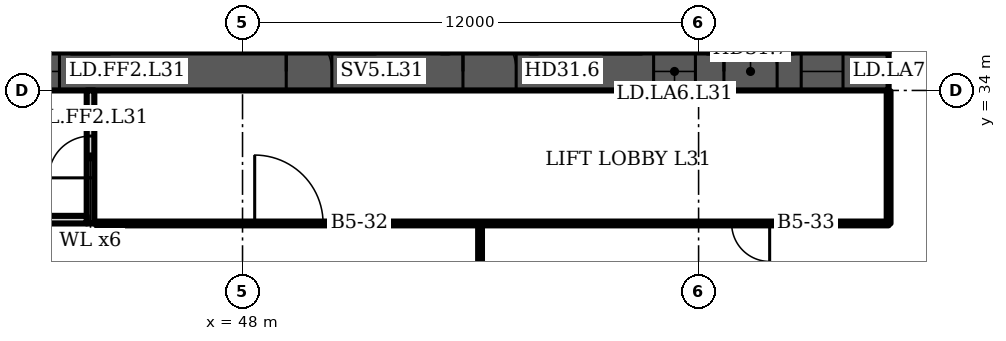
"""IFC4 building model, lengths in metres.
Left out: names, types, materials, properties, quantities, classifications, styles, units other than length and angle.
Written with IfcOpenShell. Run it as: python <this file> out.ifc"""

import sys

from ifc_helpers import new_model, si_unit, direction, frame, frame_2d, origin, place, context, subcontext, project, spatial, rectangle, extrude, element, fill, save


model = new_model("IFC4")
c1 = context("Model", 3, precision=1e-05, world=origin(), true_north=direction((0.0, 1.0)))
c2 = subcontext(c1, "Body", "Model", "MODEL_VIEW")
j1 = project(units=[si_unit("LENGTHUNIT", "METRE"), si_unit("PLANEANGLEUNIT", "RADIAN")], contexts=[c1])
p1 = place(None, origin())
s1 = spatial("IfcSite", under=j1, at=p1, CompositionType="ELEMENT")
p2 = place(p1, origin())
s2 = spatial("IfcBuilding", under=s1, at=p2, CompositionType="ELEMENT")
p3 = place(p2, frame((0.0, 0.0, 132.7)))
s3 = spatial("IfcBuildingStorey", under=s2, at=p3, CompositionType="ELEMENT", Elevation=132.7)
p4 = place(p3, frame((16.0, 34.5, 0.0), z_axis=(0.0, 0.0, 1.0), x_axis=(1.0, 0.0, 0.0)))
e1 = element("IfcWall", 1, at=p4, inside=s3, PredefinedType="SHEAR", context=c2, shape_type="SweptSolid", body=[
    extrude(rectangle(XDim=49.0, YDim=1.0, at=frame_2d((24.5, 0.0))), origin(), (0.0, 0.0, 1.0), 3.6),
])
p5 = place(p4, frame((1.2, 0.0, 0.0)))
e2 = element("IfcOpeningElement", 2, at=p5, cuts=e1, PredefinedType="OPENING", context=c2, shape_type="SweptSolid", body=[
    extrude(rectangle(XDim=1.1, YDim=2.1, at=frame_2d((0.55, 1.05))), frame((0.0, 0.51, 0.0), z_axis=(0.0, -1.0, 0.0), x_axis=(1.0, 0.0, 0.0)), (0.0, 0.0, 1.0), 1.02),
])
p6 = place(p4, frame((5.083, 0.0, 0.0)))
e3 = element("IfcOpeningElement", 3, at=p6, cuts=e1, PredefinedType="OPENING", context=c2, shape_type="SweptSolid", body=[
    extrude(rectangle(XDim=1.1, YDim=2.1, at=frame_2d((0.55, 1.05))), frame((0.0, 0.51, 0.0), z_axis=(0.0, -1.0, 0.0), x_axis=(1.0, 0.0, 0.0)), (0.0, 0.0, 1.0), 1.02),
])
p7 = place(p4, frame((2.933, 0.0, 0.0)))
e4 = element("IfcOpeningElement", 4, at=p7, cuts=e1, PredefinedType="OPENING", context=c2, shape_type="SweptSolid", body=[
    extrude(rectangle(XDim=1.4, YDim=2.1, at=frame_2d((0.7, 1.05))), frame((0.0, 0.51, 0.0), z_axis=(0.0, -1.0, 0.0), x_axis=(1.0, 0.0, 0.0)), (0.0, 0.0, 1.0), 1.02),
])
p8 = place(p4, frame((7.65, 0.0, 0.0)))
e5 = element("IfcOpeningElement", 5, at=p8, cuts=e1, PredefinedType="OPENING", context=c2, shape_type="SweptSolid", body=[
    extrude(rectangle(XDim=1.2, YDim=2.1, at=frame_2d((0.6, 1.05))), frame((0.0, 0.51, 0.0), z_axis=(0.0, -1.0, 0.0), x_axis=(1.0, 0.0, 0.0)), (0.0, 0.0, 1.0), 1.02),
])
p9 = place(p4, frame((14.817, 0.0, 0.0)))
e6 = element("IfcOpeningElement", 6, at=p9, cuts=e1, PredefinedType="OPENING", context=c2, shape_type="SweptSolid", body=[
    extrude(rectangle(XDim=1.1, YDim=2.1, at=frame_2d((0.55, 1.05))), frame((0.0, 0.51, 0.0), z_axis=(0.0, -1.0, 0.0), x_axis=(1.0, 0.0, 0.0)), (0.0, 0.0, 1.0), 1.02),
])
p10 = place(p4, frame((19.083, 0.0, 0.0)))
e7 = element("IfcOpeningElement", 7, at=p10, cuts=e1, PredefinedType="OPENING", context=c2, shape_type="SweptSolid", body=[
    extrude(rectangle(XDim=1.1, YDim=2.1, at=frame_2d((0.55, 1.05))), frame((0.0, 0.51, 0.0), z_axis=(0.0, -1.0, 0.0), x_axis=(1.0, 0.0, 0.0)), (0.0, 0.0, 1.0), 1.02),
])
p11 = place(p4, frame((16.8, 0.0, 0.0)))
e8 = element("IfcOpeningElement", 8, at=p11, cuts=e1, PredefinedType="OPENING", context=c2, shape_type="SweptSolid", body=[
    extrude(rectangle(XDim=1.4, YDim=2.1, at=frame_2d((0.7, 1.05))), frame((0.0, 0.51, 0.0), z_axis=(0.0, -1.0, 0.0), x_axis=(1.0, 0.0, 0.0)), (0.0, 0.0, 1.0), 1.02),
])
p12 = place(p4, frame((21.817, 0.0, 0.0)))
e9 = element("IfcOpeningElement", 9, at=p12, cuts=e1, PredefinedType="OPENING", context=c2, shape_type="SweptSolid", body=[
    extrude(rectangle(XDim=1.1, YDim=2.1, at=frame_2d((0.55, 1.05))), frame((0.0, 0.51, 0.0), z_axis=(0.0, -1.0, 0.0), x_axis=(1.0, 0.0, 0.0)), (0.0, 0.0, 1.0), 1.02),
])
p13 = place(p4, frame((26.083, 0.0, 0.0)))
e10 = element("IfcOpeningElement", 10, at=p13, cuts=e1, PredefinedType="OPENING", context=c2, shape_type="SweptSolid", body=[
    extrude(rectangle(XDim=1.1, YDim=2.1, at=frame_2d((0.55, 1.05))), frame((0.0, 0.51, 0.0), z_axis=(0.0, -1.0, 0.0), x_axis=(1.0, 0.0, 0.0)), (0.0, 0.0, 1.0), 1.02),
])
p14 = place(p4, frame((33.15, 0.0, 0.0)))
e11 = element("IfcOpeningElement", 11, at=p14, cuts=e1, PredefinedType="OPENING", context=c2, shape_type="SweptSolid", body=[
    extrude(rectangle(XDim=1.2, YDim=2.1, at=frame_2d((0.6, 1.05))), frame((0.0, 0.51, 0.0), z_axis=(0.0, -1.0, 0.0), x_axis=(1.0, 0.0, 0.0)), (0.0, 0.0, 1.0), 1.02),
])
p15 = place(p4, frame((37.8, 0.0, 0.0)))
e12 = element("IfcOpeningElement", 12, at=p15, cuts=e1, PredefinedType="OPENING", context=c2, shape_type="SweptSolid", body=[
    extrude(rectangle(XDim=1.4, YDim=2.1, at=frame_2d((0.7, 1.05))), frame((0.0, 0.51, 0.0), z_axis=(0.0, -1.0, 0.0), x_axis=(1.0, 0.0, 0.0)), (0.0, 0.0, 1.0), 1.02),
])
p16 = place(p4, frame((42.817, 0.0, 0.0)))
e13 = element("IfcOpeningElement", 13, at=p16, cuts=e1, PredefinedType="OPENING", context=c2, shape_type="SweptSolid", body=[
    extrude(rectangle(XDim=1.1, YDim=2.1, at=frame_2d((0.55, 1.05))), frame((0.0, 0.51, 0.0), z_axis=(0.0, -1.0, 0.0), x_axis=(1.0, 0.0, 0.0)), (0.0, 0.0, 1.0), 1.02),
])
p17 = place(p4, frame((46.7, 0.0, 0.0)))
e14 = element("IfcOpeningElement", 14, at=p17, cuts=e1, PredefinedType="OPENING", context=c2, shape_type="SweptSolid", body=[
    extrude(rectangle(XDim=1.1, YDim=2.1, at=frame_2d((0.55, 1.05))), frame((0.0, 0.51, 0.0), z_axis=(0.0, -1.0, 0.0), x_axis=(1.0, 0.0, 0.0)), (0.0, 0.0, 1.0), 1.02),
])
p18 = place(p4, frame((44.667, 0.0, 0.0)))
e15 = element("IfcOpeningElement", 15, at=p18, cuts=e1, PredefinedType="OPENING", context=c2, shape_type="SweptSolid", body=[
    extrude(rectangle(XDim=1.4, YDim=2.1, at=frame_2d((0.7, 1.05))), frame((0.0, 0.51, 0.0), z_axis=(0.0, -1.0, 0.0), x_axis=(1.0, 0.0, 0.0)), (0.0, 0.0, 1.0), 1.02),
])
p19 = place(p3, frame((44.0, 30.5, 0.0), z_axis=(0.0, 0.0, 1.0), x_axis=(0.0, 1.0, 0.0)))
e16 = element("IfcWall", 16, at=p19, inside=s3, PredefinedType="PARTITIONING", context=c2, shape_type="SweptSolid", body=[
    extrude(rectangle(XDim=3.5, YDim=0.2, at=frame_2d((1.75, 0.0))), origin(), (0.0, 0.0, 1.0), 3.2),
])
p20 = place(p19, frame((1.2, 0.0, 0.0)))
e17 = element("IfcOpeningElement", 17, at=p20, cuts=e16, PredefinedType="OPENING", context=c2, shape_type="SweptSolid", body=[
    extrude(rectangle(XDim=1.1, YDim=2.1, at=frame_2d((0.55, 1.05))), frame((0.0, 0.11, 0.0), z_axis=(0.0, -1.0, 0.0), x_axis=(1.0, 0.0, 0.0)), (0.0, 0.0, 1.0), 0.22),
])
p21 = place(p3, frame((41.1, 30.6, 0.0), z_axis=(0.0, 0.0, 1.0), x_axis=(1.0, 0.0, 0.0)))
e18 = element("IfcWall", 18, at=p21, inside=s3, PredefinedType="PARTITIONING", context=c2, shape_type="SweptSolid", body=[
    extrude(rectangle(XDim=2.8, YDim=0.2, at=frame_2d((1.4, 0.0))), origin(), (0.0, 0.0, 1.0), 3.2),
])
p22 = place(p3, frame((54.25, 20.715, 0.0), z_axis=(0.0, 0.0, 1.0), x_axis=(0.0, 1.0, 0.0)))
e19 = element("IfcWall", 19, at=p22, inside=s3, PredefinedType="PARTITIONING", context=c2, shape_type="SweptSolid", body=[
    extrude(rectangle(XDim=9.785, YDim=0.1, at=frame_2d((4.893, 0.0))), origin(), (0.0, 0.0, 1.0), 3.2),
])
p23 = place(p3, frame((65.0, 30.5, 0.0), z_axis=(0.0, 0.0, 1.0), x_axis=(0.0, 1.0, 0.0)))
e20 = element("IfcWall", 20, at=p23, inside=s3, PredefinedType="PARTITIONING", context=c2, shape_type="SweptSolid", body=[
    extrude(rectangle(XDim=3.48, YDim=0.1, at=frame_2d((1.74, 0.0))), origin(), (0.0, 0.0, 1.0), 3.2),
])
p24 = place(p3, frame((44.15, 30.5, 0.0), z_axis=(0.0, 0.0, 1.0), x_axis=(1.0, 0.0, 0.0)))
e21 = element("IfcWall", 21, at=p24, inside=s3, PredefinedType="PARTITIONING", context=c2, shape_type="SweptSolid", body=[
    extrude(rectangle(XDim=20.85, YDim=0.1, at=frame_2d((10.425, 0.0))), origin(), (0.0, 0.0, 1.0), 3.2),
])
p25 = place(p24, frame((4.17, 0.0, 0.0)))
e22 = element("IfcOpeningElement", 22, at=p25, cuts=e21, PredefinedType="OPENING", context=c2, shape_type="SweptSolid", body=[
    extrude(rectangle(XDim=1.8, YDim=2.1, at=frame_2d((0.9, 1.05))), frame((0.0, 0.06, 0.0), z_axis=(0.0, -1.0, 0.0), x_axis=(1.0, 0.0, 0.0)), (0.0, 0.0, 1.0), 0.12),
])
p26 = place(p24, frame((16.72, 0.0, 0.0)))
e23 = element("IfcOpeningElement", 23, at=p26, cuts=e21, PredefinedType="OPENING", context=c2, shape_type="SweptSolid", body=[
    extrude(rectangle(XDim=1.0, YDim=2.1, at=frame_2d((0.5, 1.05))), frame((0.0, 0.06, 0.0), z_axis=(0.0, -1.0, 0.0), x_axis=(1.0, 0.0, 0.0)), (0.0, 0.0, 1.0), 0.12),
])
p27 = place(p13, origin())
e24 = element("IfcDoor", 24, at=p27, inside=s3, OperationType="DOUBLE_DOOR_SLIDING", PredefinedType="DOOR", context=c2, shape_type="SweptSolid", body=[
    extrude(rectangle(XDim=1.1, YDim=2.1, at=frame_2d((0.55, 1.05))), frame((0.0, 0.025, 0.0), z_axis=(0.0, -1.0, 0.0), x_axis=(1.0, 0.0, 0.0)), (0.0, 0.0, 1.0), 0.05),
])
fill(e10, e24)
p28 = place(p14, origin())
e25 = element("IfcDoor", 25, at=p28, inside=s3, OperationType="SINGLE_SWING_LEFT", PredefinedType="DOOR", context=c2, shape_type="SweptSolid", body=[
    extrude(rectangle(XDim=1.2, YDim=2.1, at=frame_2d((0.6, 1.05))), frame((0.0, 0.025, 0.0), z_axis=(0.0, -1.0, 0.0), x_axis=(1.0, 0.0, 0.0)), (0.0, 0.0, 1.0), 0.05),
])
fill(e11, e25)
p29 = place(p15, origin())
e26 = element("IfcDoor", 26, at=p29, inside=s3, OperationType="DOUBLE_DOOR_SINGLE_SWING", PredefinedType="DOOR", context=c2, shape_type="SweptSolid", body=[
    extrude(rectangle(XDim=1.4, YDim=2.1, at=frame_2d((0.7, 1.05))), frame((0.0, 0.025, 0.0), z_axis=(0.0, -1.0, 0.0), x_axis=(1.0, 0.0, 0.0)), (0.0, 0.0, 1.0), 0.05),
])
fill(e12, e26)
p30 = place(p16, origin())
e27 = element("IfcDoor", 27, at=p30, inside=s3, OperationType="DOUBLE_DOOR_SLIDING", PredefinedType="DOOR", context=c2, shape_type="SweptSolid", body=[
    extrude(rectangle(XDim=1.1, YDim=2.1, at=frame_2d((0.55, 1.05))), frame((0.0, 0.025, 0.0), z_axis=(0.0, -1.0, 0.0), x_axis=(1.0, 0.0, 0.0)), (0.0, 0.0, 1.0), 0.05),
])
fill(e13, e27)
p31 = place(p17, origin())
e28 = element("IfcDoor", 28, at=p31, inside=s3, OperationType="DOUBLE_DOOR_SLIDING", PredefinedType="DOOR", context=c2, shape_type="SweptSolid", body=[
    extrude(rectangle(XDim=1.1, YDim=2.1, at=frame_2d((0.55, 1.05))), frame((0.0, 0.025, 0.0), z_axis=(0.0, -1.0, 0.0), x_axis=(1.0, 0.0, 0.0)), (0.0, 0.0, 1.0), 0.05),
])
fill(e14, e28)
p32 = place(p18, origin())
e29 = element("IfcDoor", 29, at=p32, inside=s3, OperationType="DOUBLE_DOOR_SINGLE_SWING", PredefinedType="DOOR", context=c2, shape_type="SweptSolid", body=[
    extrude(rectangle(XDim=1.4, YDim=2.1, at=frame_2d((0.7, 1.05))), frame((0.0, 0.025, 0.0), z_axis=(0.0, -1.0, 0.0), x_axis=(1.0, 0.0, 0.0)), (0.0, 0.0, 1.0), 0.05),
])
fill(e15, e29)
p33 = place(p20, origin())
e30 = element("IfcDoor", 30, at=p33, inside=s3, OperationType="SINGLE_SWING_LEFT", PredefinedType="DOOR", context=c2, shape_type="SweptSolid", body=[
    extrude(rectangle(XDim=1.1, YDim=2.1, at=frame_2d((0.55, 1.05))), frame((0.0, 0.025, 0.0), z_axis=(0.0, -1.0, 0.0), x_axis=(1.0, 0.0, 0.0)), (0.0, 0.0, 1.0), 0.05),
])
fill(e17, e30)
p34 = place(p25, origin())
e31 = element("IfcDoor", 31, at=p34, inside=s3, OperationType="DOUBLE_DOOR_SINGLE_SWING", PredefinedType="DOOR", context=c2, shape_type="SweptSolid", body=[
    extrude(rectangle(XDim=1.8, YDim=2.1, at=frame_2d((0.9, 1.05))), frame((0.0, 0.025, 0.0), z_axis=(0.0, -1.0, 0.0), x_axis=(1.0, 0.0, 0.0)), (0.0, 0.0, 1.0), 0.05),
])
fill(e22, e31)
p35 = place(p26, origin())
e32 = element("IfcDoor", 32, at=p35, inside=s3, OperationType="SINGLE_SWING_RIGHT", PredefinedType="DOOR", context=c2, shape_type="SweptSolid", body=[
    extrude(rectangle(XDim=1.0, YDim=2.1, at=frame_2d((0.5, 1.05))), frame((0.0, 0.025, 0.0), z_axis=(0.0, -1.0, 0.0), x_axis=(1.0, 0.0, 0.0)), (0.0, 0.0, 1.0), 0.05),
])
fill(e23, e32)
save(model, sys.argv[1])
